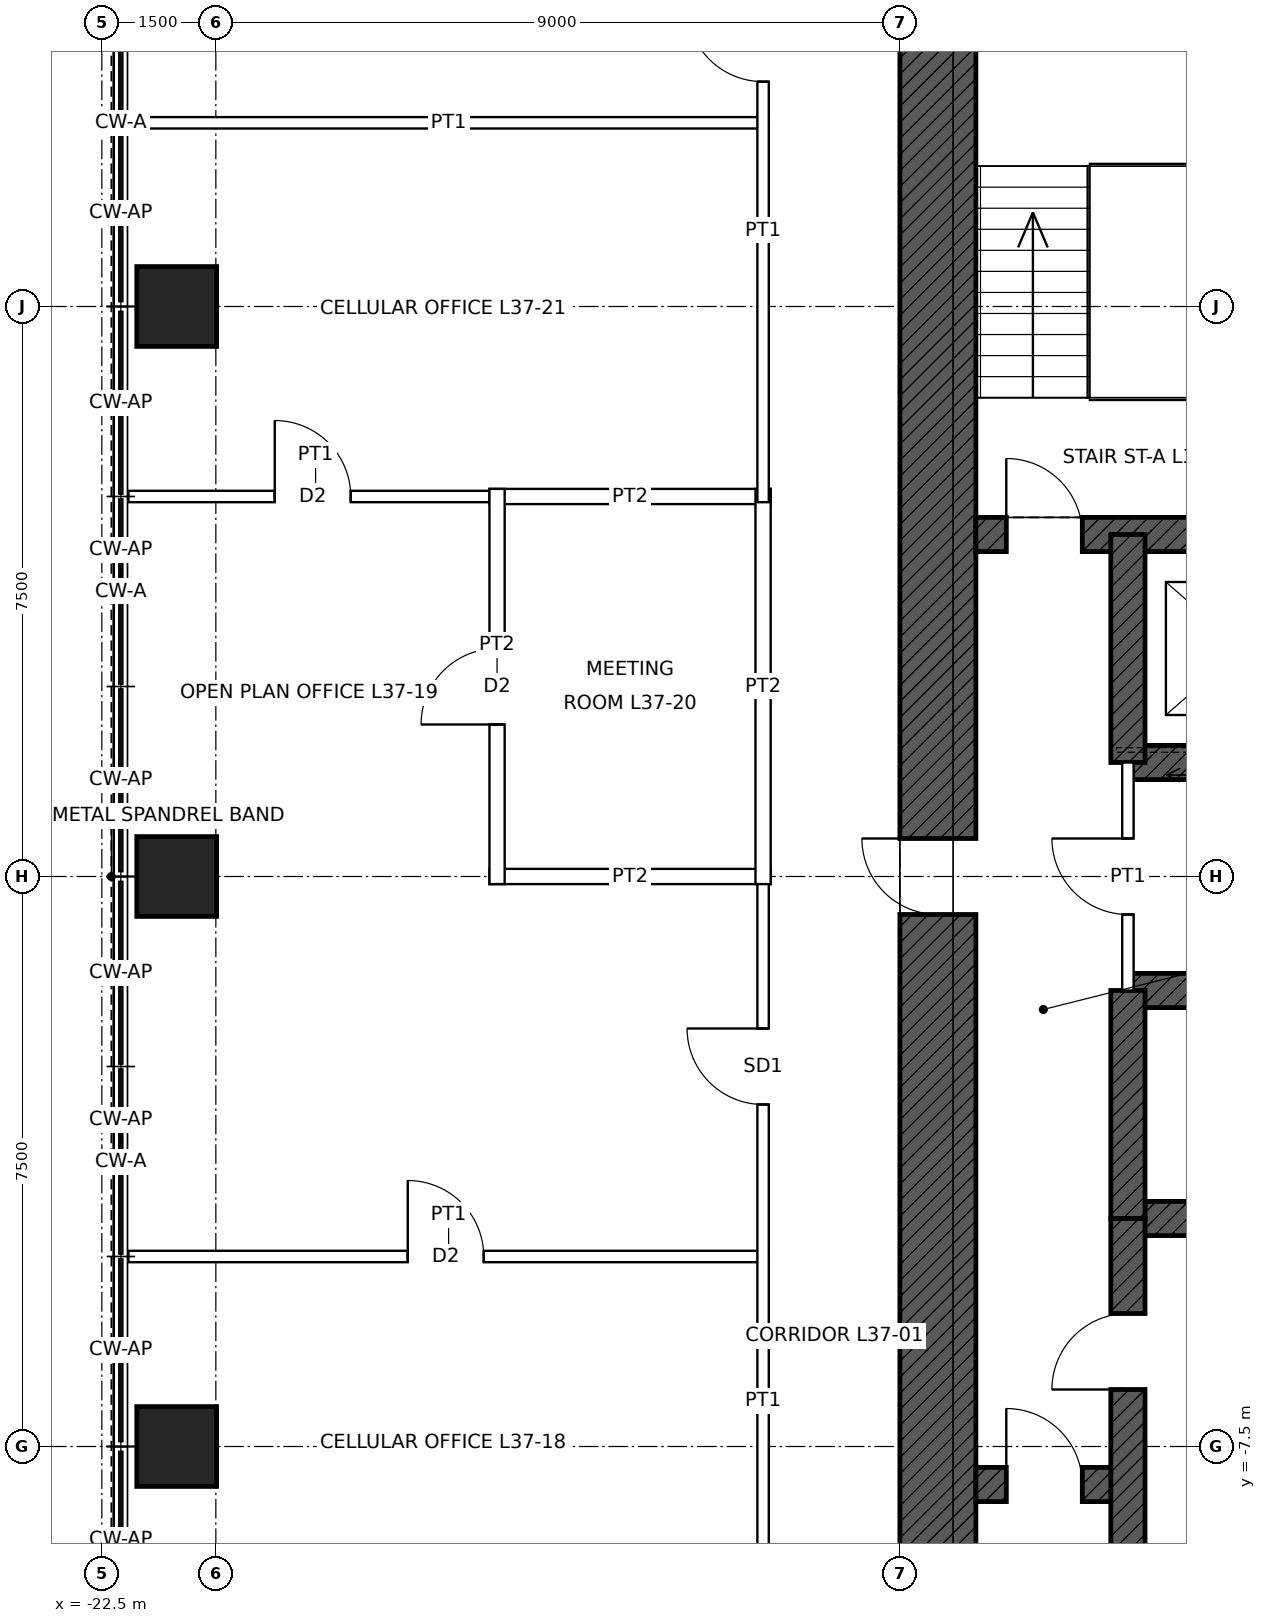
"""IFC4 building model, lengths in metres.
Left out: names, types, materials, properties, quantities, classifications, styles, units other than length and angle.
Written with IfcOpenShell. Run it as: python <this file> out.ifc"""

import sys

from ifc_helpers import new_model, si_unit, direction, frame, frame_2d, origin, origin_2d, place, context, subcontext, project, spatial, rectangle, hollow_rectangle, extrude, element, fill, save


model = new_model("IFC4")
c1 = context("Model", 3, precision=1e-05, world=origin(), true_north=direction((0.0, 1.0)))
c2 = subcontext(c1, "Body", "Model", "MODEL_VIEW")
j1 = project(units=[si_unit("LENGTHUNIT", "METRE"), si_unit("PLANEANGLEUNIT", "RADIAN")], contexts=[c1])
p1 = place(None, origin())
s1 = spatial("IfcSite", under=j1, at=p1, CompositionType="ELEMENT")
p2 = place(p1, origin())
s2 = spatial("IfcBuilding", under=s1, at=p2, CompositionType="ELEMENT")
p3 = place(p2, frame((0.0, 0.0, 181.9)))
s3 = spatial("IfcBuildingStorey", under=s2, at=p3, CompositionType="ELEMENT", Elevation=181.9)
p4 = place(p3, frame((-21.515, -7.5, 0.0), z_axis=(0.0, 0.0, 1.0), x_axis=(1.0, 0.0, 0.0)))
e1 = element("IfcColumn", 1, at=p4, inside=s3, PredefinedType="COLUMN", context=c2, shape_type="SweptSolid", body=[
    extrude(hollow_rectangle(XDim=1.05, YDim=1.05, WallThickness=0.075, at=origin_2d()), origin(), (0.0, 0.0, 1.0), 4.0),
])
p5 = place(p3, frame((-21.515, 0.0, 0.0), z_axis=(0.0, 0.0, 1.0), x_axis=(1.0, 0.0, 0.0)))
e2 = element("IfcColumn", 2, at=p5, inside=s3, PredefinedType="COLUMN", context=c2, shape_type="SweptSolid", body=[
    extrude(hollow_rectangle(XDim=1.05, YDim=1.05, WallThickness=0.07, at=origin_2d()), origin(), (0.0, 0.0, 1.0), 4.0),
])
p6 = place(p3, frame((-21.515, 7.5, 0.0), z_axis=(0.0, 0.0, 1.0), x_axis=(1.0, 0.0, 0.0)))
e3 = element("IfcColumn", 3, at=p6, inside=s3, PredefinedType="COLUMN", context=c2, shape_type="SweptSolid", body=[
    extrude(hollow_rectangle(XDim=1.05, YDim=1.05, WallThickness=0.075, at=origin_2d()), origin(), (0.0, 0.0, 1.0), 4.0),
])
p7 = place(p3, frame((-11.5, -11.0, 0.0), z_axis=(0.0, 0.0, 1.0), x_axis=(0.0, 1.0, 0.0)))
e4 = element("IfcWall", 4, at=p7, inside=s3, PredefinedType="SHEAR", context=c2, shape_type="SweptSolid", body=[
    extrude(rectangle(XDim=22.0, YDim=1.0, at=frame_2d((11.0, 0.0))), origin(), (0.0, 0.0, 1.0), 4.0),
])
p8 = place(p7, frame((10.5, 0.0, 0.0)))
e5 = element("IfcOpeningElement", 5, at=p8, cuts=e4, PredefinedType="OPENING", context=c2, shape_type="SweptSolid", body=[
    extrude(rectangle(XDim=1.0, YDim=2.4, at=frame_2d((0.5, 1.2))), frame((0.0, 0.51, 0.0), z_axis=(0.0, -1.0, 0.0), x_axis=(1.0, 0.0, 0.0)), (0.0, 0.0, 1.0), 1.02),
])
p9 = place(p3, frame((-11.0, 4.5, 0.0), z_axis=(0.0, 0.0, 1.0), x_axis=(1.0, 0.0, 0.0)))
e6 = element("IfcWall", 6, at=p9, inside=s3, PredefinedType="SHEAR", context=c2, shape_type="SweptSolid", body=[
    extrude(rectangle(XDim=22.0, YDim=0.45, at=frame_2d((11.0, 0.0))), origin(), (0.0, 0.0, 1.0), 4.0),
])
p10 = place(p9, frame((0.4, 0.0, 0.0)))
e7 = element("IfcOpeningElement", 7, at=p10, cuts=e6, PredefinedType="OPENING", context=c2, shape_type="SweptSolid", body=[
    extrude(rectangle(XDim=1.0, YDim=2.1, at=frame_2d((0.5, 1.05))), frame((0.0, 0.235, 0.0), z_axis=(0.0, -1.0, 0.0), x_axis=(1.0, 0.0, 0.0)), (0.0, 0.0, 1.0), 0.47),
])
p11 = place(p9, frame((20.6, 0.0, 0.0)))
e8 = element("IfcOpeningElement", 8, at=p11, cuts=e6, PredefinedType="OPENING", context=c2, shape_type="SweptSolid", body=[
    extrude(rectangle(XDim=1.0, YDim=2.1, at=frame_2d((0.5, 1.05))), frame((0.0, 0.235, 0.0), z_axis=(0.0, -1.0, 0.0), x_axis=(1.0, 0.0, 0.0)), (0.0, 0.0, 1.0), 0.47),
])
p12 = place(p3, frame((-9.0, 1.5, 0.0), z_axis=(0.0, 0.0, 1.0), x_axis=(1.0, 0.0, 0.0)))
e9 = element("IfcWall", 9, at=p12, inside=s3, PredefinedType="SHEAR", context=c2, shape_type="SweptSolid", body=[
    extrude(rectangle(XDim=18.0, YDim=0.45, at=frame_2d((9.0, 0.0))), origin(), (0.0, 0.0, 1.0), 4.0),
])
p13 = place(p12, frame((0.95, 0.0, 0.0)))
e10 = element("IfcOpeningElement", 10, at=p13, cuts=e9, PredefinedType="OPENING", context=c2, shape_type="SweptSolid", body=[
    extrude(rectangle(XDim=1.1, YDim=2.1, at=frame_2d((0.55, 1.05))), frame((0.0, 0.235, 0.0), z_axis=(0.0, -1.0, 0.0), x_axis=(1.0, 0.0, 0.0)), (0.0, 0.0, 1.0), 0.47),
])
p14 = place(p12, frame((3.95, 0.0, 0.0)))
e11 = element("IfcOpeningElement", 11, at=p14, cuts=e9, PredefinedType="OPENING", context=c2, shape_type="SweptSolid", body=[
    extrude(rectangle(XDim=1.1, YDim=2.1, at=frame_2d((0.55, 1.05))), frame((0.0, 0.235, 0.0), z_axis=(0.0, -1.0, 0.0), x_axis=(1.0, 0.0, 0.0)), (0.0, 0.0, 1.0), 0.47),
])
p15 = place(p12, frame((6.95, 0.0, 0.0)))
e12 = element("IfcOpeningElement", 12, at=p15, cuts=e9, PredefinedType="OPENING", context=c2, shape_type="SweptSolid", body=[
    extrude(rectangle(XDim=1.1, YDim=2.1, at=frame_2d((0.55, 1.05))), frame((0.0, 0.235, 0.0), z_axis=(0.0, -1.0, 0.0), x_axis=(1.0, 0.0, 0.0)), (0.0, 0.0, 1.0), 0.47),
])
p16 = place(p12, frame((9.95, 0.0, 0.0)))
e13 = element("IfcOpeningElement", 13, at=p16, cuts=e9, PredefinedType="OPENING", context=c2, shape_type="SweptSolid", body=[
    extrude(rectangle(XDim=1.1, YDim=2.1, at=frame_2d((0.55, 1.05))), frame((0.0, 0.235, 0.0), z_axis=(0.0, -1.0, 0.0), x_axis=(1.0, 0.0, 0.0)), (0.0, 0.0, 1.0), 0.47),
])
p17 = place(p12, frame((12.95, 0.0, 0.0)))
e14 = element("IfcOpeningElement", 14, at=p17, cuts=e9, PredefinedType="OPENING", context=c2, shape_type="SweptSolid", body=[
    extrude(rectangle(XDim=1.1, YDim=2.1, at=frame_2d((0.55, 1.05))), frame((0.0, 0.235, 0.0), z_axis=(0.0, -1.0, 0.0), x_axis=(1.0, 0.0, 0.0)), (0.0, 0.0, 1.0), 0.47),
])
p18 = place(p12, frame((15.95, 0.0, 0.0)))
e15 = element("IfcOpeningElement", 15, at=p18, cuts=e9, PredefinedType="OPENING", context=c2, shape_type="SweptSolid", body=[
    extrude(rectangle(XDim=1.1, YDim=2.1, at=frame_2d((0.55, 1.05))), frame((0.0, 0.235, 0.0), z_axis=(0.0, -1.0, 0.0), x_axis=(1.0, 0.0, 0.0)), (0.0, 0.0, 1.0), 0.47),
])
for number, where, z_axis, x_axis in (
    (16, (-9.0, -1.5, 0.0), (0.0, 0.0, 1.0), (1.0, 0.0, 0.0)),
    (17, (-9.0, -4.5, 0.0), (0.0, 0.0, 1.0), (1.0, 0.0, 0.0)),
):
    element("IfcWall", number, at=place(p3, frame(where, z_axis=z_axis, x_axis=x_axis)), inside=s3, PredefinedType="SHEAR", context=c2, shape_type="SweptSolid", body=[
        extrude(rectangle(XDim=18.0, YDim=0.45, at=frame_2d((9.0, 0.0))), origin(), (0.0, 0.0, 1.0), 4.0),
    ])
p19 = place(p3, frame((-11.0, -8.0, 0.0), z_axis=(0.0, 0.0, 1.0), x_axis=(1.0, 0.0, 0.0)))
e18 = element("IfcWall", 18, at=p19, inside=s3, PredefinedType="SHEAR", context=c2, shape_type="SweptSolid", body=[
    extrude(rectangle(XDim=2.0, YDim=0.45, at=frame_2d((1.0, 0.0))), origin(), (0.0, 0.0, 1.0), 4.0),
])
p20 = place(p19, frame((0.4, 0.0, 0.0)))
e19 = element("IfcOpeningElement", 19, at=p20, cuts=e18, PredefinedType="OPENING", context=c2, shape_type="SweptSolid", body=[
    extrude(rectangle(XDim=1.0, YDim=2.1, at=frame_2d((0.5, 1.05))), frame((0.0, 0.235, 0.0), z_axis=(0.0, -1.0, 0.0), x_axis=(1.0, 0.0, 0.0)), (0.0, 0.0, 1.0), 0.47),
])
for number, where, z_axis, x_axis in (
    (20, (-9.0, 1.5, 0.0), (0.0, 0.0, 1.0), (0.0, 1.0, 0.0)),
    (21, (-9.0, -4.5, 0.0), (0.0, 0.0, 1.0), (0.0, 1.0, 0.0)),
):
    element("IfcWall", number, at=place(p3, frame(where, z_axis=z_axis, x_axis=x_axis)), inside=s3, PredefinedType="SHEAR", context=c2, shape_type="SweptSolid", body=[
        extrude(rectangle(XDim=3.0, YDim=0.45, at=frame_2d((1.5, 0.0))), origin(), (0.0, 0.0, 1.0), 4.0),
    ])
p21 = place(p3, frame((-9.0, -11.0, 0.0), z_axis=(0.0, 0.0, 1.0), x_axis=(0.0, 1.0, 0.0)))
e22 = element("IfcWall", 22, at=p21, inside=s3, PredefinedType="SHEAR", context=c2, shape_type="SweptSolid", body=[
    extrude(rectangle(XDim=6.5, YDim=0.45, at=frame_2d((3.25, 0.0))), origin(), (0.0, 0.0, 1.0), 4.0),
])
p22 = place(p21, frame((4.25, 0.0, 0.0)))
e23 = element("IfcOpeningElement", 23, at=p22, cuts=e22, PredefinedType="OPENING", context=c2, shape_type="SweptSolid", body=[
    extrude(rectangle(XDim=1.0, YDim=2.1, at=frame_2d((0.5, 1.05))), frame((0.0, 0.235, 0.0), z_axis=(0.0, -1.0, 0.0), x_axis=(1.0, 0.0, 0.0)), (0.0, 0.0, 1.0), 0.47),
])
p23 = place(p3, frame((-22.15, -5.0, 0.0), z_axis=(0.0, 0.0, 1.0), x_axis=(1.0, 0.0, 0.0)))
e24 = element("IfcWall", 24, at=p23, inside=s3, PredefinedType="PARTITIONING", context=c2, shape_type="SweptSolid", body=[
    extrude(rectangle(XDim=8.425, YDim=0.15, at=frame_2d((4.212, 0.0))), origin(), (0.0, 0.0, 1.0), 3.85),
])
p24 = place(p23, frame((3.675, 0.0, 0.0)))
e25 = element("IfcOpeningElement", 25, at=p24, cuts=e24, PredefinedType="OPENING", context=c2, shape_type="SweptSolid", body=[
    extrude(rectangle(XDim=1.0, YDim=2.1, at=frame_2d((0.5, 1.05))), frame((0.0, 0.085, 0.0), z_axis=(0.0, -1.0, 0.0), x_axis=(1.0, 0.0, 0.0)), (0.0, 0.0, 1.0), 0.17),
])
p25 = place(p3, frame((-17.4, 0.0, 0.0), z_axis=(0.0, 0.0, 1.0), x_axis=(1.0, 0.0, 0.0)))
e26 = element("IfcWall", 26, at=p25, inside=s3, PredefinedType="PARTITIONING", context=c2, shape_type="SweptSolid", body=[
    extrude(rectangle(XDim=3.7, YDim=0.2, at=frame_2d((1.85, 0.0))), origin(), (0.0, 0.0, 1.0), 3.238),
])
p26 = place(p3, frame((-22.15, 5.0, 0.0), z_axis=(0.0, 0.0, 1.0), x_axis=(1.0, 0.0, 0.0)))
e27 = element("IfcWall", 27, at=p26, inside=s3, PredefinedType="PARTITIONING", context=c2, shape_type="SweptSolid", body=[
    extrude(rectangle(XDim=4.925, YDim=0.15, at=frame_2d((2.462, 0.0))), origin(), (0.0, 0.0, 1.0), 3.85),
])
p27 = place(p26, frame((1.925, 0.0, 0.0)))
e28 = element("IfcOpeningElement", 28, at=p27, cuts=e27, PredefinedType="OPENING", context=c2, shape_type="SweptSolid", body=[
    extrude(rectangle(XDim=1.0, YDim=2.1, at=frame_2d((0.5, 1.05))), frame((0.0, 0.085, 0.0), z_axis=(0.0, -1.0, 0.0), x_axis=(1.0, 0.0, 0.0)), (0.0, 0.0, 1.0), 0.17),
])
p28 = place(p3, frame((-17.4, 5.0, 0.0), z_axis=(0.0, 0.0, 1.0), x_axis=(1.0, 0.0, 0.0)))
e29 = element("IfcWall", 29, at=p28, inside=s3, PredefinedType="PARTITIONING", context=c2, shape_type="SweptSolid", body=[
    extrude(rectangle(XDim=3.7, YDim=0.2, at=frame_2d((1.85, 0.0))), origin(), (0.0, 0.0, 1.0), 3.85),
])
p29 = place(p3, frame((-22.15, 9.917, 0.0), z_axis=(0.0, 0.0, 1.0), x_axis=(1.0, 0.0, 0.0)))
e30 = element("IfcWall", 30, at=p29, inside=s3, PredefinedType="PARTITIONING", context=c2, shape_type="SweptSolid", body=[
    extrude(rectangle(XDim=8.425, YDim=0.15, at=frame_2d((4.212, 0.0))), origin(), (0.0, 0.0, 1.0), 3.85),
])
p30 = place(p3, frame((-17.3, -0.1, 0.0), z_axis=(0.0, 0.0, 1.0), x_axis=(0.0, 1.0, 0.0)))
e31 = element("IfcWall", 31, at=p30, inside=s3, PredefinedType="PARTITIONING", context=c2, shape_type="SweptSolid", body=[
    extrude(rectangle(XDim=5.2, YDim=0.2, at=frame_2d((2.6, 0.0))), origin(), (0.0, 0.0, 1.0), 3.85),
])
p31 = place(p30, frame((2.1, 0.0, 0.0)))
e32 = element("IfcOpeningElement", 32, at=p31, cuts=e31, PredefinedType="OPENING", context=c2, shape_type="SweptSolid", body=[
    extrude(rectangle(XDim=1.0, YDim=2.1, at=frame_2d((0.5, 1.05))), frame((0.0, 0.11, 0.0), z_axis=(0.0, -1.0, 0.0), x_axis=(1.0, 0.0, 0.0)), (0.0, 0.0, 1.0), 0.22),
])
p32 = place(p3, frame((-13.8, -13.875, 0.0), z_axis=(0.0, 0.0, 1.0), x_axis=(0.0, 1.0, 0.0)))
e33 = element("IfcWall", 33, at=p32, inside=s3, PredefinedType="PARTITIONING", context=c2, shape_type="SweptSolid", body=[
    extrude(rectangle(XDim=13.95, YDim=0.15, at=frame_2d((6.975, 0.0))), origin(), (0.0, 0.0, 1.0), 3.85),
])
p33 = place(p32, frame((10.875, 0.0, 0.0)))
e34 = element("IfcOpeningElement", 34, at=p33, cuts=e33, PredefinedType="OPENING", context=c2, shape_type="SweptSolid", body=[
    extrude(rectangle(XDim=1.0, YDim=2.4, at=frame_2d((0.5, 1.2))), frame((0.0, 0.085, 0.0), z_axis=(0.0, -1.0, 0.0), x_axis=(1.0, 0.0, 0.0)), (0.0, 0.0, 1.0), 0.17),
])
p34 = place(p3, frame((-13.8, -0.1, 0.0), z_axis=(0.0, 0.0, 1.0), x_axis=(0.0, 1.0, 0.0)))
e35 = element("IfcWall", 35, at=p34, inside=s3, PredefinedType="PARTITIONING", context=c2, shape_type="SweptSolid", body=[
    extrude(rectangle(XDim=5.2, YDim=0.2, at=frame_2d((2.6, 0.0))), origin(), (0.0, 0.0, 1.0), 3.85),
])
p35 = place(p3, frame((-13.8, 4.925, 0.0), z_axis=(0.0, 0.0, 1.0), x_axis=(0.0, 1.0, 0.0)))
e36 = element("IfcWall", 36, at=p35, inside=s3, PredefinedType="PARTITIONING", context=c2, shape_type="SweptSolid", body=[
    extrude(rectangle(XDim=7.15, YDim=0.15, at=frame_2d((3.575, 0.0))), origin(), (0.0, 0.0, 1.0), 3.85),
])
p36 = place(p35, frame((5.533, 0.0, 0.0)))
e37 = element("IfcOpeningElement", 37, at=p36, cuts=e36, PredefinedType="OPENING", context=c2, shape_type="SweptSolid", body=[
    extrude(rectangle(XDim=1.0, YDim=2.4, at=frame_2d((0.5, 1.2))), frame((0.0, 0.085, 0.0), z_axis=(0.0, -1.0, 0.0), x_axis=(1.0, 0.0, 0.0)), (0.0, 0.0, 1.0), 0.17),
])
p37 = place(p3, frame((-9.0, -1.5, 0.0), z_axis=(0.0, 0.0, 1.0), x_axis=(0.0, 1.0, 0.0)))
e38 = element("IfcWall", 38, at=p37, inside=s3, PredefinedType="PARTITIONING", context=c2, shape_type="SweptSolid", body=[
    extrude(rectangle(XDim=3.0, YDim=0.15, at=frame_2d((1.5, 0.0))), origin(), (0.0, 0.0, 1.0), 3.75),
])
p38 = place(p37, frame((1.0, 0.0, 0.0)))
e39 = element("IfcOpeningElement", 39, at=p38, cuts=e38, PredefinedType="OPENING", context=c2, shape_type="SweptSolid", body=[
    extrude(rectangle(XDim=1.0, YDim=2.4, at=frame_2d((0.5, 1.2))), frame((0.0, 0.085, 0.0), z_axis=(0.0, -1.0, 0.0), x_axis=(1.0, 0.0, 0.0)), (0.0, 0.0, 1.0), 0.17),
])
p39 = place(p10, origin())
e40 = element("IfcDoor", 40, at=p39, inside=s3, OperationType="SINGLE_SWING_LEFT", PredefinedType="DOOR", context=c2, shape_type="SweptSolid", body=[
    extrude(rectangle(XDim=1.0, YDim=2.1, at=frame_2d((0.5, 1.05))), frame((0.0, 0.025, 0.0), z_axis=(0.0, -1.0, 0.0), x_axis=(1.0, 0.0, 0.0)), (0.0, 0.0, 1.0), 0.05),
])
fill(e7, e40)
p40 = place(p8, origin())
e41 = element("IfcDoor", 41, at=p40, inside=s3, OperationType="SINGLE_SWING_RIGHT", PredefinedType="DOOR", context=c2, shape_type="SweptSolid", body=[
    extrude(rectangle(XDim=1.0, YDim=2.4, at=frame_2d((0.5, 1.2))), frame((0.0, 0.485, 0.0), z_axis=(0.0, -1.0, 0.0), x_axis=(1.0, 0.0, 0.0)), (0.0, 0.0, 1.0), 0.05),
])
fill(e5, e41)
p41 = place(p22, origin())
e42 = element("IfcDoor", 42, at=p41, inside=s3, OperationType="SINGLE_SWING_LEFT", PredefinedType="DOOR", context=c2, shape_type="SweptSolid", body=[
    extrude(rectangle(XDim=1.0, YDim=2.1, at=frame_2d((0.5, 1.05))), frame((0.0, 0.025, 0.0), z_axis=(0.0, -1.0, 0.0), x_axis=(1.0, 0.0, 0.0)), (0.0, 0.0, 1.0), 0.05),
])
fill(e23, e42)
p42 = place(p20, origin())
e43 = element("IfcDoor", 43, at=p42, inside=s3, OperationType="SINGLE_SWING_LEFT", PredefinedType="DOOR", context=c2, shape_type="SweptSolid", body=[
    extrude(rectangle(XDim=1.0, YDim=2.1, at=frame_2d((0.5, 1.05))), frame((0.0, 0.025, 0.0), z_axis=(0.0, -1.0, 0.0), x_axis=(1.0, 0.0, 0.0)), (0.0, 0.0, 1.0), 0.05),
])
fill(e19, e43)
p43 = place(p38, origin())
e44 = element("IfcDoor", 44, at=p43, inside=s3, OperationType="SINGLE_SWING_RIGHT", PredefinedType="DOOR", context=c2, shape_type="SweptSolid", body=[
    extrude(rectangle(XDim=1.0, YDim=2.4, at=frame_2d((0.5, 1.2))), frame((0.0, 0.025, 0.0), z_axis=(0.0, -1.0, 0.0), x_axis=(1.0, 0.0, 0.0)), (0.0, 0.0, 1.0), 0.05),
])
fill(e39, e44)
p44 = place(p24, origin())
e45 = element("IfcDoor", 45, at=p44, inside=s3, OperationType="SINGLE_SWING_LEFT", PredefinedType="DOOR", context=c2, shape_type="SweptSolid", body=[
    extrude(rectangle(XDim=1.0, YDim=2.1, at=frame_2d((0.5, 1.05))), frame((0.0, 0.025, 0.0), z_axis=(0.0, -1.0, 0.0), x_axis=(1.0, 0.0, 0.0)), (0.0, 0.0, 1.0), 0.05),
])
fill(e25, e45)
p45 = place(p33, origin())
e46 = element("IfcDoor", 46, at=p45, inside=s3, OperationType="SINGLE_SWING_RIGHT", PredefinedType="DOOR", context=c2, shape_type="SweptSolid", body=[
    extrude(rectangle(XDim=1.0, YDim=2.4, at=frame_2d((0.5, 1.2))), frame((0.0, 0.025, 0.0), z_axis=(0.0, -1.0, 0.0), x_axis=(1.0, 0.0, 0.0)), (0.0, 0.0, 1.0), 0.05),
])
fill(e34, e46)
p46 = place(p31, origin())
e47 = element("IfcDoor", 47, at=p46, inside=s3, OperationType="SINGLE_SWING_LEFT", PredefinedType="DOOR", context=c2, shape_type="SweptSolid", body=[
    extrude(rectangle(XDim=1.0, YDim=2.1, at=frame_2d((0.5, 1.05))), frame((0.0, 0.025, 0.0), z_axis=(0.0, -1.0, 0.0), x_axis=(1.0, 0.0, 0.0)), (0.0, 0.0, 1.0), 0.05),
])
fill(e32, e47)
p47 = place(p27, origin())
e48 = element("IfcDoor", 48, at=p47, inside=s3, OperationType="SINGLE_SWING_LEFT", PredefinedType="DOOR", context=c2, shape_type="SweptSolid", body=[
    extrude(rectangle(XDim=1.0, YDim=2.1, at=frame_2d((0.5, 1.05))), frame((0.0, 0.025, 0.0), z_axis=(0.0, -1.0, 0.0), x_axis=(1.0, 0.0, 0.0)), (0.0, 0.0, 1.0), 0.05),
])
fill(e28, e48)
p48 = place(p36, origin())
e49 = element("IfcDoor", 49, at=p48, inside=s3, OperationType="SINGLE_SWING_RIGHT", PredefinedType="DOOR", context=c2, shape_type="SweptSolid", body=[
    extrude(rectangle(XDim=1.0, YDim=2.4, at=frame_2d((0.5, 1.2))), frame((0.0, 0.025, 0.0), z_axis=(0.0, -1.0, 0.0), x_axis=(1.0, 0.0, 0.0)), (0.0, 0.0, 1.0), 0.05),
])
fill(e37, e49)
save(model, sys.argv[1])
